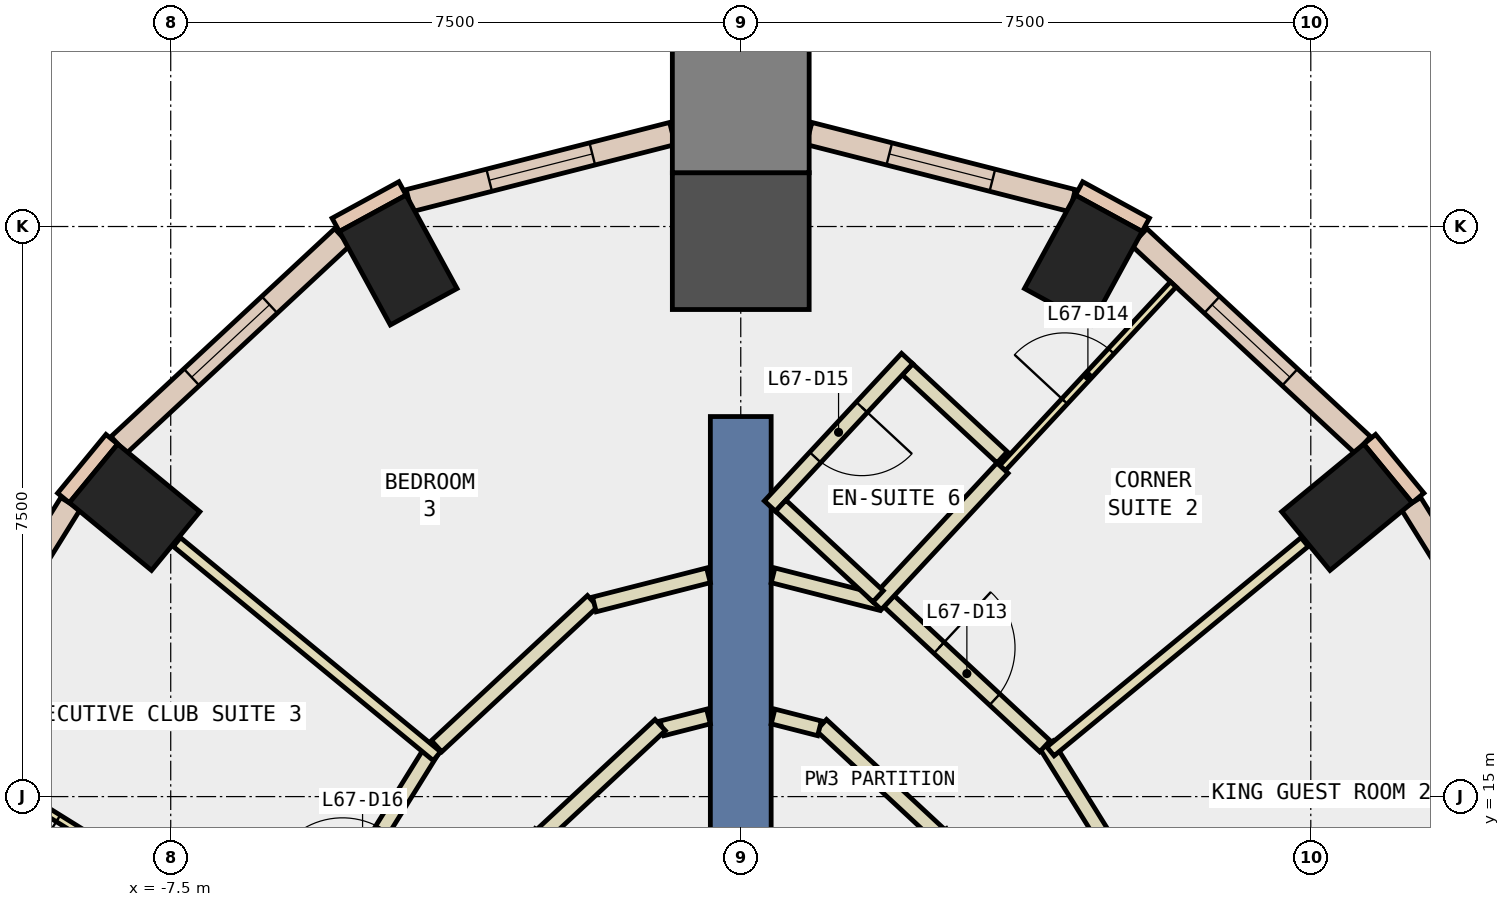
"""IFC4 building model, lengths in metres.
Left out: names, types, materials, properties, quantities, classifications, styles, units other than length and angle.
Written with IfcOpenShell. Run it as: python <this file> out.ifc"""

import sys

from ifc_helpers import new_model, si_unit, direction, frame, frame_2d, origin, origin_2d, place, context, subcontext, project, spatial, rectangle, extrude, element, fill, save


model = new_model("IFC4")
c1 = context("Model", 3, precision=1e-05, world=origin(), true_north=direction((0.0, 1.0)))
c2 = subcontext(c1, "Body", "Model", "MODEL_VIEW")
j1 = project(units=[si_unit("LENGTHUNIT", "METRE"), si_unit("PLANEANGLEUNIT", "RADIAN")], contexts=[c1])
p1 = place(None, origin())
s1 = spatial("IfcSite", under=j1, at=p1, CompositionType="ELEMENT")
p2 = place(p1, origin())
s2 = spatial("IfcBuilding", under=s1, at=p2, CompositionType="ELEMENT")
p3 = place(p2, frame((0.0, 0.0, 290.0)))
s3 = spatial("IfcBuildingStorey", under=s2, at=p3, CompositionType="ELEMENT", Elevation=290.0)
for number, where, z_axis, x_axis in (
    (1, (7.975, 18.807, -0.34), (0.0, 0.0, 1.0), (-0.636, 0.772, 0.0)),
    (2, (4.507, 22.059, -0.34), (0.0, 0.0, 1.0), (-0.878, 0.479, 0.0)),
):
    element("IfcColumn", number, at=place(p3, frame(where, z_axis=z_axis, x_axis=x_axis)), inside=s3, PredefinedType="COLUMN", context=c2, shape_type="SweptSolid", body=[
        extrude(rectangle(XDim=1.0, YDim=1.4, at=origin_2d()), origin(), (0.0, 0.0, 1.0), 3.6),
    ])
p4 = place(p3, frame((0.0, 22.308, -0.34), z_axis=(0.0, 0.0, 1.0), x_axis=(0.0, 1.0, 0.0)))
e3 = element("IfcColumn", 3, at=p4, inside=s3, PredefinedType="COLUMN", context=c2, shape_type="SweptSolid", body=[
    extrude(rectangle(XDim=1.8, YDim=1.8, at=origin_2d()), origin(), (0.0, 0.0, 1.0), 3.6),
])
for number, where, z_axis, x_axis in (
    (4, (-4.507, 22.059, -0.34), (0.0, 0.0, 1.0), (0.878, 0.479, 0.0)),
    (5, (-7.975, 18.807, -0.34), (0.0, 0.0, 1.0), (0.636, 0.772, 0.0)),
):
    element("IfcColumn", number, at=place(p3, frame(where, z_axis=z_axis, x_axis=x_axis)), inside=s3, PredefinedType="COLUMN", context=c2, shape_type="SweptSolid", body=[
        extrude(rectangle(XDim=1.0, YDim=1.4, at=origin_2d()), origin(), (0.0, 0.0, 1.0), 3.6),
    ])
p5 = place(p3, frame((0.0, 24.108, -0.34), z_axis=(0.0, 0.0, 1.0), x_axis=(0.0, 1.0, 0.0)))
e6 = element("IfcColumn", 6, at=p5, inside=s3, PredefinedType="COLUMN", context=c2, shape_type="SweptSolid", body=[
    extrude(rectangle(XDim=1.8, YDim=1.8, at=origin_2d()), origin(), (0.0, 0.0, 1.0), 3.6),
])
p6 = place(p3, frame((0.0, 11.0, -0.34), z_axis=(0.0, 0.0, 1.0), x_axis=(0.0, 1.0, 0.0)))
e7 = element("IfcWall", 7, at=p6, inside=s3, PredefinedType="SHEAR", context=c2, shape_type="SweptSolid", body=[
    extrude(rectangle(XDim=9.0, YDim=0.8, at=frame_2d((4.5, 0.0))), origin(), (0.0, 0.0, 1.0), 3.6),
])
for number, where, z_axis, x_axis in (
    (8, (5.329, 22.522, 0.0), (0.0, 0.0, 1.0), (-0.878, 0.479, 0.0)),
    (9, (-4.451, 23.001, 0.0), (0.0, 0.0, 1.0), (-0.878, -0.479, 0.0)),
    (10, (8.911, 18.929, 0.0), (0.0, 0.0, 1.0), (-0.636, 0.772, 0.0)),
    (11, (-8.275, 19.701, 0.0), (0.0, 0.0, 1.0), (-0.636, -0.772, 0.0)),
):
    element("IfcWall", number, at=place(p3, frame(where, z_axis=z_axis, x_axis=x_axis)), inside=s3, PredefinedType="STANDARD", context=c2, shape_type="SweptSolid", body=[
        extrude(rectangle(XDim=1.0, YDim=0.2, at=frame_2d((0.5, 0.0))), origin(), (0.0, 0.0, 1.0), 3.26),
    ])
p7 = place(p3, frame((12.659, 12.675, 0.0), z_axis=(0.0, 0.0, 1.0), x_axis=(-0.527762071678, 0.849392250788, 0.0)))
e12 = element("IfcWall", 12, at=p7, inside=s3, PredefinedType="STANDARD", context=c2, shape_type="SweptSolid", body=[
    extrude(rectangle(XDim=7.276, YDim=0.3, at=frame_2d((3.638, 0.0))), origin(), (0.0, 0.0, 1.0), 3.26),
])
p8 = place(p7, frame((0.719, 0.0, 0.9)))
e13 = element("IfcOpeningElement", 13, at=p8, cuts=e12, PredefinedType="OPENING", context=c2, shape_type="SweptSolid", body=[
    extrude(rectangle(XDim=2.2, YDim=2.0, at=frame_2d((1.1, 1.0))), frame((0.0, 0.16, 0.0), z_axis=(0.0, -1.0, 0.0), x_axis=(1.0, 0.0, 0.0)), (0.0, 0.0, 1.0), 0.32),
])
p9 = place(p7, frame((4.357, 0.0, 0.9)))
e14 = element("IfcOpeningElement", 14, at=p9, cuts=e12, PredefinedType="OPENING", context=c2, shape_type="SweptSolid", body=[
    extrude(rectangle(XDim=2.2, YDim=2.0, at=frame_2d((1.1, 1.0))), frame((0.0, 0.16, 0.0), z_axis=(0.0, -1.0, 0.0), x_axis=(1.0, 0.0, 0.0)), (0.0, 0.0, 1.0), 0.32),
])
p10 = place(p3, frame((8.184, 19.626, 0.0), z_axis=(0.0, 0.0, 1.0), x_axis=(-0.732397380344, 0.680877431896, 0.0)))
e15 = element("IfcWall", 15, at=p10, inside=s3, PredefinedType="STANDARD", context=c2, shape_type="SweptSolid", body=[
    extrude(rectangle(XDim=4.019, YDim=0.3, at=frame_2d((2.009, 0.0))), origin(), (0.0, 0.0, 1.0), 3.26),
])
p11 = place(p10, frame((1.309, 0.0, 0.9)))
e16 = element("IfcOpeningElement", 16, at=p11, cuts=e15, PredefinedType="OPENING", context=c2, shape_type="SweptSolid", body=[
    extrude(rectangle(XDim=1.4, YDim=2.0, at=frame_2d((0.7, 1.0))), frame((0.0, 0.16, 0.0), z_axis=(0.0, -1.0, 0.0), x_axis=(1.0, 0.0, 0.0)), (0.0, 0.0, 1.0), 0.32),
])
p12 = place(p3, frame((4.365, 22.84, 0.0), z_axis=(0.0, 0.0, 1.0), x_axis=(-0.968979290476, 0.247141932156, 0.0)))
e17 = element("IfcWall", 17, at=p12, inside=s3, PredefinedType="STANDARD", context=c2, shape_type="SweptSolid", body=[
    extrude(rectangle(XDim=3.577, YDim=0.3, at=frame_2d((1.789, 0.0))), origin(), (0.0, 0.0, 1.0), 3.26),
])
p13 = place(p12, frame((1.088, 0.0, 0.9)))
e18 = element("IfcOpeningElement", 18, at=p13, cuts=e17, PredefinedType="OPENING", context=c2, shape_type="SweptSolid", body=[
    extrude(rectangle(XDim=1.4, YDim=2.0, at=frame_2d((0.7, 1.0))), frame((0.0, 0.16, 0.0), z_axis=(0.0, -1.0, 0.0), x_axis=(1.0, 0.0, 0.0)), (0.0, 0.0, 1.0), 0.32),
])
p14 = place(p3, frame((-0.899, 23.724, 0.0), z_axis=(0.0, 0.0, 1.0), x_axis=(-0.968979290476, -0.247141932156, 0.0)))
e19 = element("IfcWall", 19, at=p14, inside=s3, PredefinedType="STANDARD", context=c2, shape_type="SweptSolid", body=[
    extrude(rectangle(XDim=3.577, YDim=0.3, at=frame_2d((1.789, 0.0))), origin(), (0.0, 0.0, 1.0), 3.26),
])
p15 = place(p14, frame((1.088, 0.0, 0.9)))
e20 = element("IfcOpeningElement", 20, at=p15, cuts=e19, PredefinedType="OPENING", context=c2, shape_type="SweptSolid", body=[
    extrude(rectangle(XDim=1.4, YDim=2.0, at=frame_2d((0.7, 1.0))), frame((0.0, 0.16, 0.0), z_axis=(0.0, -1.0, 0.0), x_axis=(1.0, 0.0, 0.0)), (0.0, 0.0, 1.0), 0.32),
])
p16 = place(p3, frame((-5.241, 22.362, 0.0), z_axis=(0.0, 0.0, 1.0), x_axis=(-0.732397380344, -0.680877431896, 0.0)))
e21 = element("IfcWall", 21, at=p16, inside=s3, PredefinedType="STANDARD", context=c2, shape_type="SweptSolid", body=[
    extrude(rectangle(XDim=4.019, YDim=0.3, at=frame_2d((2.009, 0.0))), origin(), (0.0, 0.0, 1.0), 3.26),
])
p17 = place(p16, frame((1.309, 0.0, 0.9)))
e22 = element("IfcOpeningElement", 22, at=p17, cuts=e21, PredefinedType="OPENING", context=c2, shape_type="SweptSolid", body=[
    extrude(rectangle(XDim=1.4, YDim=2.0, at=frame_2d((0.7, 1.0))), frame((0.0, 0.16, 0.0), z_axis=(0.0, -1.0, 0.0), x_axis=(1.0, 0.0, 0.0)), (0.0, 0.0, 1.0), 0.32),
])
p18 = place(p3, frame((-8.819, 18.855, 0.0), z_axis=(0.0, 0.0, 1.0), x_axis=(-0.527762071678, -0.849392250788, 0.0)))
e23 = element("IfcWall", 23, at=p18, inside=s3, PredefinedType="STANDARD", context=c2, shape_type="SweptSolid", body=[
    extrude(rectangle(XDim=7.276, YDim=0.3, at=frame_2d((3.638, 0.0))), origin(), (0.0, 0.0, 1.0), 3.26),
])
p19 = place(p18, frame((0.719, 0.0, 0.9)))
e24 = element("IfcOpeningElement", 24, at=p19, cuts=e23, PredefinedType="OPENING", context=c2, shape_type="SweptSolid", body=[
    extrude(rectangle(XDim=2.2, YDim=2.0, at=frame_2d((1.1, 1.0))), frame((0.0, 0.16, 0.0), z_axis=(0.0, -1.0, 0.0), x_axis=(1.0, 0.0, 0.0)), (0.0, 0.0, 1.0), 0.32),
])
p20 = place(p18, frame((4.357, 0.0, 0.9)))
e25 = element("IfcOpeningElement", 25, at=p20, cuts=e23, PredefinedType="OPENING", context=c2, shape_type="SweptSolid", body=[
    extrude(rectangle(XDim=2.2, YDim=2.0, at=frame_2d((1.1, 1.0))), frame((0.0, 0.16, 0.0), z_axis=(0.0, -1.0, 0.0), x_axis=(1.0, 0.0, 0.0)), (0.0, 0.0, 1.0), 0.32),
])
p21 = place(p3, frame((2.6, 14.509, 0.0), z_axis=(0.0, 0.0, 1.0), x_axis=(-0.732355024595, 0.680922989735, 0.0)))
e26 = element("IfcWall", 26, at=p21, inside=s3, PredefinedType="PARTITIONING", context=c2, shape_type="SweptSolid", body=[
    extrude(rectangle(XDim=2.103, YDim=0.2, at=frame_2d((1.051, 0.0))), origin(), (0.0, 0.0, 1.0), 3.26),
])
for number, where, z_axis, x_axis in (
    (27, (1.036, 15.898, 0.0), (0.0, 0.0, 1.0), (-0.969, 0.247, 0.0)),
    (28, (-0.425, 16.054, 0.0), (0.0, 0.0, 1.0), (-0.969, -0.247, 0.0)),
):
    element("IfcWall", number, at=place(p3, frame(where, z_axis=z_axis, x_axis=x_axis)), inside=s3, PredefinedType="PARTITIONING", context=c2, shape_type="SweptSolid", body=[
        extrude(rectangle(XDim=0.63, YDim=0.2, at=frame_2d((0.315, 0.0))), origin(), (0.0, 0.0, 1.0), 3.26),
    ])
p22 = place(p3, frame((-1.06, 15.941, 0.0), z_axis=(0.0, 0.0, 1.0), x_axis=(-0.732355024595, -0.680922989735, 0.0)))
e29 = element("IfcWall", 29, at=p22, inside=s3, PredefinedType="PARTITIONING", context=c2, shape_type="SweptSolid", body=[
    extrude(rectangle(XDim=2.103, YDim=0.2, at=frame_2d((1.051, 0.0))), origin(), (0.0, 0.0, 1.0), 3.26),
])
p23 = place(p3, frame((4.022, 15.68, 0.0), z_axis=(0.0, 0.0, 1.0), x_axis=(0.527737948498, -0.849407239029, 0.0)))
e30 = element("IfcWall", 30, at=p23, inside=s3, PredefinedType="PARTITIONING", context=c2, shape_type="SweptSolid", body=[
    extrude(rectangle(XDim=5.217, YDim=0.2, at=frame_2d((2.608, 0.0))), origin(), (0.0, 0.0, 1.0), 3.26),
])
p24 = place(p23, frame((2.159, 0.0, 0.0)))
e31 = element("IfcOpeningElement", 31, at=p24, cuts=e30, PredefinedType="OPENING", context=c2, shape_type="SweptSolid", body=[
    extrude(rectangle(XDim=1.0, YDim=2.1, at=frame_2d((0.5, 1.05))), frame((0.0, 0.11, 0.0), z_axis=(0.0, -1.0, 0.0), x_axis=(1.0, 0.0, 0.0)), (0.0, 0.0, 1.0), 0.22),
])
p25 = place(p3, frame((1.949, 17.572, 0.0), z_axis=(0.0, 0.0, 1.0), x_axis=(0.732331154554, -0.680948661846, 0.0)))
e32 = element("IfcWall", 32, at=p25, inside=s3, PredefinedType="PARTITIONING", context=c2, shape_type="SweptSolid", body=[
    extrude(rectangle(XDim=2.803, YDim=0.2, at=frame_2d((1.402, 0.0))), origin(), (0.0, 0.0, 1.0), 3.26),
])
p26 = place(p25, frame((0.901, 0.0, 0.0)))
e33 = element("IfcOpeningElement", 33, at=p26, cuts=e32, PredefinedType="OPENING", context=c2, shape_type="SweptSolid", body=[
    extrude(rectangle(XDim=1.0, YDim=2.1, at=frame_2d((0.5, 1.05))), frame((0.0, 0.11, 0.0), z_axis=(0.0, -1.0, 0.0), x_axis=(1.0, 0.0, 0.0)), (0.0, 0.0, 1.0), 0.22),
])
p27 = place(p3, frame((-4.002, 15.663, 0.0), z_axis=(0.0, 0.0, 1.0), x_axis=(0.732331154554, 0.680948661846, 0.0)))
e34 = element("IfcWall", 34, at=p27, inside=s3, PredefinedType="PARTITIONING", context=c2, shape_type="SweptSolid", body=[
    extrude(rectangle(XDim=2.803, YDim=0.2, at=frame_2d((1.402, 0.0))), origin(), (0.0, 0.0, 1.0), 3.26),
])
p28 = place(p3, frame((-1.926, 17.528, 0.0), z_axis=(0.0, 0.0, 1.0), x_axis=(0.968981980879, 0.247131383542, 0.0)))
e35 = element("IfcWall", 35, at=p28, inside=s3, PredefinedType="PARTITIONING", context=c2, shape_type="SweptSolid", body=[
    extrude(rectangle(XDim=1.549, YDim=0.2, at=frame_2d((0.774, 0.0))), origin(), (0.0, 0.0, 1.0), 3.26),
])
p29 = place(p3, frame((0.425, 17.911, 0.0), z_axis=(0.0, 0.0, 1.0), x_axis=(0.969051069597, -0.246860334023, 0.0)))
e36 = element("IfcWall", 36, at=p29, inside=s3, PredefinedType="PARTITIONING", context=c2, shape_type="SweptSolid", body=[
    extrude(rectangle(XDim=1.474, YDim=0.2, at=frame_2d((0.737, 0.0))), origin(), (0.0, 0.0, 1.0), 3.26),
])
p30 = place(p3, frame((-5.889, 12.675, 0.0), z_axis=(0.0, 0.0, 1.0), x_axis=(0.527550626699, 0.849523593709, 0.0)))
e37 = element("IfcWall", 37, at=p30, inside=s3, PredefinedType="PARTITIONING", context=c2, shape_type="SweptSolid", body=[
    extrude(rectangle(XDim=3.463, YDim=0.2, at=frame_2d((1.731, 0.0))), origin(), (0.0, 0.0, 1.0), 3.26),
])
p31 = place(p30, frame((1.231, 0.0, 0.0)))
e38 = element("IfcOpeningElement", 38, at=p31, cuts=e37, PredefinedType="OPENING", context=c2, shape_type="SweptSolid", body=[
    extrude(rectangle(XDim=1.0, YDim=2.1, at=frame_2d((0.5, 1.05))), frame((0.0, 0.11, 0.0), z_axis=(0.0, -1.0, 0.0), x_axis=(1.0, 0.0, 0.0)), (0.0, 0.0, 1.0), 0.22),
])
p32 = place(p3, frame((4.075, 15.595, 0.0), z_axis=(0.0, 0.0, 1.0), x_axis=(0.771899326406, 0.635744783616, 0.0)))
e39 = element("IfcWall", 39, at=p32, inside=s3, PredefinedType="PARTITIONING", context=c2, shape_type="SweptSolid", body=[
    extrude(rectangle(XDim=4.332, YDim=0.15, at=frame_2d((2.166, 0.0))), origin(), (0.0, 0.0, 1.0), 3.26),
])
p33 = place(p3, frame((3.444, 19.322, 0.0), z_axis=(0.0, 0.0, 1.0), x_axis=(0.68085394361, 0.732419215662, 0.0)))
e40 = element("IfcWall", 40, at=p33, inside=s3, PredefinedType="PARTITIONING", context=c2, shape_type="SweptSolid", body=[
    extrude(rectangle(XDim=3.3, YDim=0.1, at=frame_2d((1.65, 0.0))), origin(), (0.0, 0.0, 1.0), 3.26),
])
p34 = place(p33, frame((1.2, 0.0, 0.0)))
e41 = element("IfcOpeningElement", 41, at=p34, cuts=e40, PredefinedType="OPENING", context=c2, shape_type="SweptSolid", body=[
    extrude(rectangle(XDim=0.9, YDim=2.1, at=frame_2d((0.45, 1.05))), frame((0.0, 0.06, 0.0), z_axis=(0.0, -1.0, 0.0), x_axis=(1.0, 0.0, 0.0)), (0.0, 0.0, 1.0), 0.12),
])
p35 = place(p3, frame((1.776, 17.528, 0.0), z_axis=(0.0, 0.0, 1.0), x_axis=(0.680978439741, 0.732303464834, 0.0)))
e42 = element("IfcWall", 42, at=p35, inside=s3, PredefinedType="PARTITIONING", context=c2, shape_type="SweptSolid", body=[
    extrude(rectangle(XDim=2.45, YDim=0.2, at=frame_2d((1.225, 0.0))), origin(), (0.0, 0.0, 1.0), 3.26),
])
p36 = place(p3, frame((3.439, 19.464, 0.0), z_axis=(0.0, 0.0, 1.0), x_axis=(-0.732491549411, 0.68077612329, 0.0)))
e43 = element("IfcWall", 43, at=p36, inside=s3, PredefinedType="PARTITIONING", context=c2, shape_type="SweptSolid", body=[
    extrude(rectangle(XDim=1.699, YDim=0.2, at=frame_2d((0.85, 0.0))), origin(), (0.0, 0.0, 1.0), 3.26),
])
p37 = place(p3, frame((2.189, 20.763, 0.0), z_axis=(0.0, 0.0, 1.0), x_axis=(-0.680987945319, -0.73229462536, 0.0)))
e44 = element("IfcWall", 44, at=p37, inside=s3, PredefinedType="PARTITIONING", context=c2, shape_type="SweptSolid", body=[
    extrude(rectangle(XDim=2.65, YDim=0.2, at=frame_2d((1.325, 0.0))), origin(), (0.0, 0.0, 1.0), 3.26),
])
p38 = place(p37, frame((0.875, 0.0, 0.0)))
e45 = element("IfcOpeningElement", 45, at=p38, cuts=e44, PredefinedType="OPENING", context=c2, shape_type="SweptSolid", body=[
    extrude(rectangle(XDim=0.9, YDim=2.1, at=frame_2d((0.45, 1.05))), frame((0.0, 0.11, 0.0), z_axis=(0.0, -1.0, 0.0), x_axis=(1.0, 0.0, 0.0)), (0.0, 0.0, 1.0), 0.22),
])
p39 = place(p3, frame((0.526, 18.827, 0.0), z_axis=(0.0, 0.0, 1.0), x_axis=(0.732112296378, -0.681183958628, 0.0)))
e46 = element("IfcWall", 46, at=p39, inside=s3, PredefinedType="PARTITIONING", context=c2, shape_type="SweptSolid", body=[
    extrude(rectangle(XDim=1.75, YDim=0.2, at=frame_2d((0.875, 0.0))), origin(), (0.0, 0.0, 1.0), 3.26),
])
p40 = place(p3, frame((-3.998, 15.532, 0.0), z_axis=(0.0, 0.0, 1.0), x_axis=(-0.771938186867, 0.635697597649, 0.0)))
e47 = element("IfcWall", 47, at=p40, inside=s3, PredefinedType="PARTITIONING", context=c2, shape_type="SweptSolid", body=[
    extrude(rectangle(XDim=4.432, YDim=0.15, at=frame_2d((2.216, 0.0))), origin(), (0.0, 0.0, 1.0), 3.26),
])
p41 = place(p3, frame((-8.13, 14.185, 0.0), z_axis=(0.0, 0.0, 1.0), x_axis=(-0.849305726881, 0.527901299759, 0.0)))
e48 = element("IfcWall", 48, at=p41, inside=s3, PredefinedType="PARTITIONING", context=c2, shape_type="SweptSolid", body=[
    extrude(rectangle(XDim=2.9, YDim=0.1, at=frame_2d((1.45, 0.0))), origin(), (0.0, 0.0, 1.0), 3.26),
])
p42 = place(p41, frame((1.0, 0.0, 0.0)))
e49 = element("IfcOpeningElement", 49, at=p42, cuts=e48, PredefinedType="OPENING", context=c2, shape_type="SweptSolid", body=[
    extrude(rectangle(XDim=0.9, YDim=2.1, at=frame_2d((0.45, 1.05))), frame((0.0, 0.06, 0.0), z_axis=(0.0, -1.0, 0.0), x_axis=(1.0, 0.0, 0.0)), (0.0, 0.0, 1.0), 0.12),
])
p43 = place(p11, origin())
e50 = element("IfcWindow", 50, at=p43, inside=s3, PartitioningType="SINGLE_PANEL", PredefinedType="WINDOW", context=c2, shape_type="SweptSolid", body=[
    extrude(rectangle(XDim=1.4, YDim=2.0, at=frame_2d((0.7, 1.0))), frame((0.0, 0.03, 0.0), z_axis=(0.0, -1.0, 0.0), x_axis=(1.0, 0.0, 0.0)), (0.0, 0.0, 1.0), 0.06),
])
fill(e16, e50)
p44 = place(p13, origin())
e51 = element("IfcWindow", 51, at=p44, inside=s3, PartitioningType="SINGLE_PANEL", PredefinedType="WINDOW", context=c2, shape_type="SweptSolid", body=[
    extrude(rectangle(XDim=1.4, YDim=2.0, at=frame_2d((0.7, 1.0))), frame((0.0, 0.03, 0.0), z_axis=(0.0, -1.0, 0.0), x_axis=(1.0, 0.0, 0.0)), (0.0, 0.0, 1.0), 0.06),
])
fill(e18, e51)
p45 = place(p15, origin())
e52 = element("IfcWindow", 52, at=p45, inside=s3, PartitioningType="SINGLE_PANEL", PredefinedType="WINDOW", context=c2, shape_type="SweptSolid", body=[
    extrude(rectangle(XDim=1.4, YDim=2.0, at=frame_2d((0.7, 1.0))), frame((0.0, 0.03, 0.0), z_axis=(0.0, -1.0, 0.0), x_axis=(1.0, 0.0, 0.0)), (0.0, 0.0, 1.0), 0.06),
])
fill(e20, e52)
p46 = place(p17, origin())
e53 = element("IfcWindow", 53, at=p46, inside=s3, PartitioningType="SINGLE_PANEL", PredefinedType="WINDOW", context=c2, shape_type="SweptSolid", body=[
    extrude(rectangle(XDim=1.4, YDim=2.0, at=frame_2d((0.7, 1.0))), frame((0.0, 0.03, 0.0), z_axis=(0.0, -1.0, 0.0), x_axis=(1.0, 0.0, 0.0)), (0.0, 0.0, 1.0), 0.06),
])
fill(e22, e53)
p47 = place(p26, origin())
e54 = element("IfcDoor", 54, at=p47, inside=s3, OperationType="SINGLE_SWING_LEFT", PredefinedType="DOOR", context=c2, shape_type="SweptSolid", body=[
    extrude(rectangle(XDim=1.0, YDim=2.1, at=frame_2d((0.5, 1.05))), frame((0.0, 0.025, 0.0), z_axis=(0.0, -1.0, 0.0), x_axis=(1.0, 0.0, 0.0)), (0.0, 0.0, 1.0), 0.05),
])
fill(e33, e54)
p48 = place(p34, origin())
e55 = element("IfcDoor", 55, at=p48, inside=s3, OperationType="SINGLE_SWING_LEFT", PredefinedType="DOOR", context=c2, shape_type="SweptSolid", body=[
    extrude(rectangle(XDim=0.9, YDim=2.1, at=frame_2d((0.45, 1.05))), frame((0.0, 0.025, 0.0), z_axis=(0.0, -1.0, 0.0), x_axis=(1.0, 0.0, 0.0)), (0.0, 0.0, 1.0), 0.05),
])
fill(e41, e55)
p49 = place(p38, origin())
e56 = element("IfcDoor", 56, at=p49, inside=s3, OperationType="SINGLE_SWING_LEFT", PredefinedType="DOOR", context=c2, shape_type="SweptSolid", body=[
    extrude(rectangle(XDim=0.9, YDim=2.1, at=frame_2d((0.45, 1.05))), frame((0.0, 0.025, 0.0), z_axis=(0.0, -1.0, 0.0), x_axis=(1.0, 0.0, 0.0)), (0.0, 0.0, 1.0), 0.05),
])
fill(e45, e56)
p50 = place(p42, origin())
e57 = element("IfcDoor", 57, at=p50, inside=s3, OperationType="SINGLE_SWING_LEFT", PredefinedType="DOOR", context=c2, shape_type="SweptSolid", body=[
    extrude(rectangle(XDim=0.9, YDim=2.1, at=frame_2d((0.45, 1.05))), frame((0.0, 0.025, 0.0), z_axis=(0.0, -1.0, 0.0), x_axis=(1.0, 0.0, 0.0)), (0.0, 0.0, 1.0), 0.05),
])
fill(e49, e57)
save(model, sys.argv[1])
